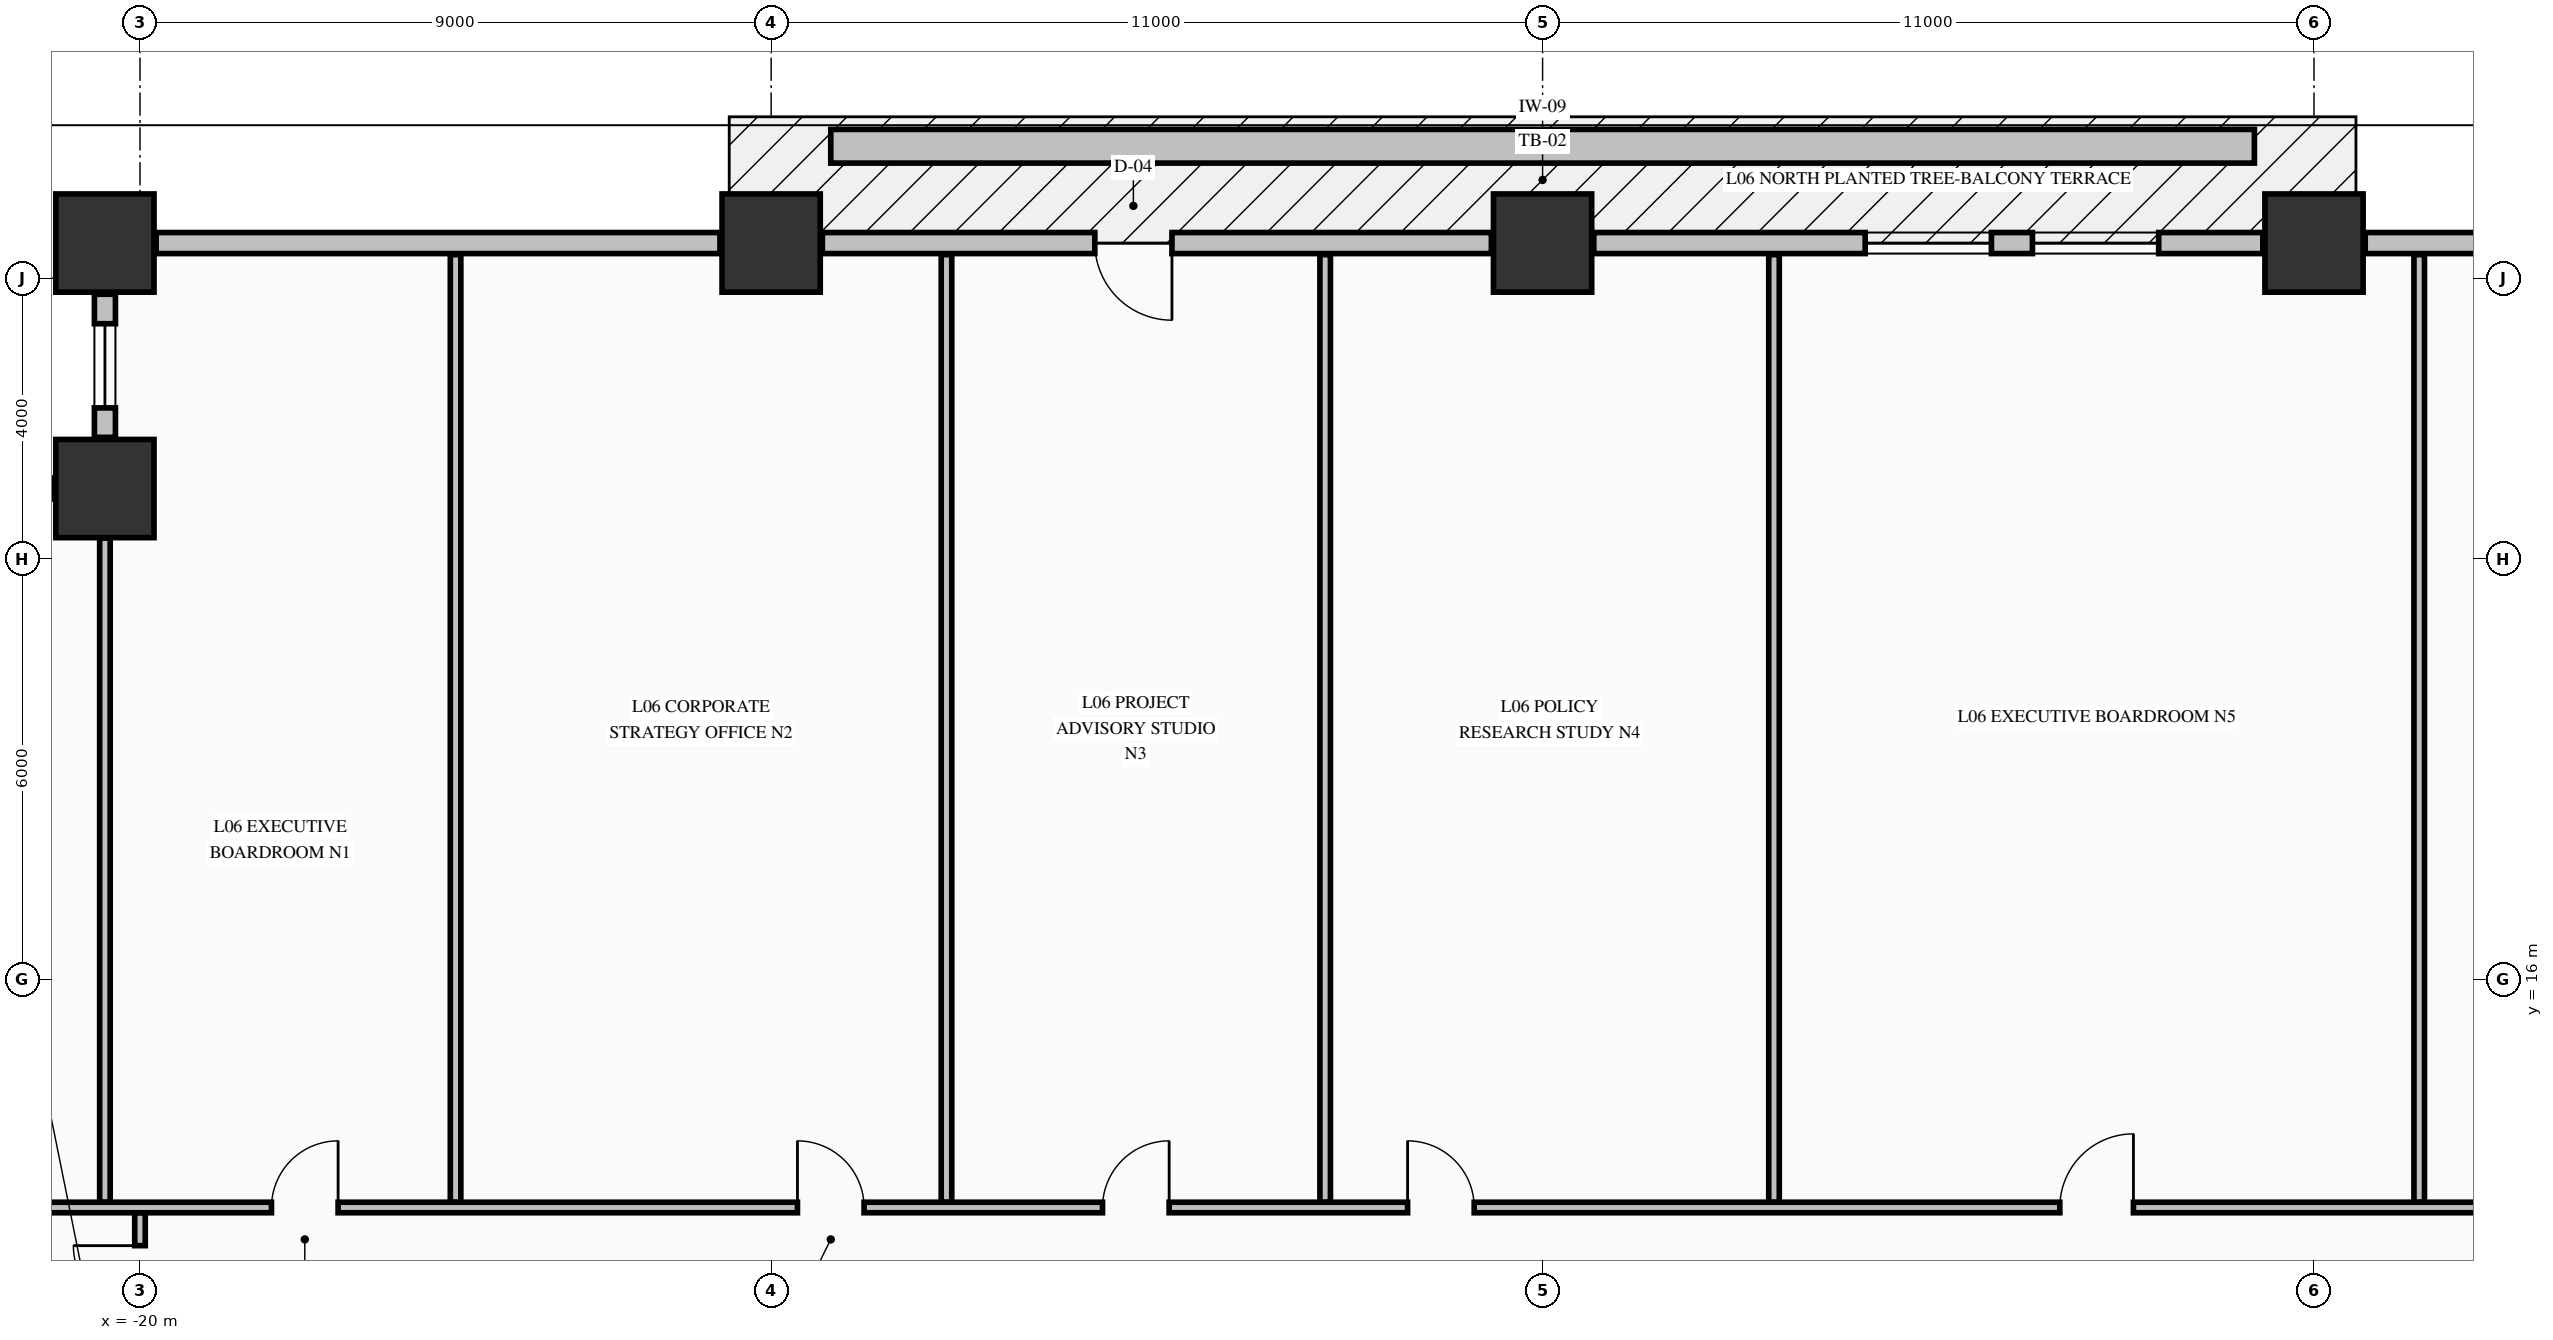
"""IFC4 building model, lengths in metres.
Left out: names, types, materials, properties, quantities, classifications, styles, units other than length and angle.
Written with IfcOpenShell. Run it as: python <this file> out.ifc"""

import sys

from ifc_helpers import new_model, si_unit, direction, frame, frame_2d, origin, origin_2d, place, context, subcontext, project, spatial, rectangle, extrude, element, fill, save


model = new_model("IFC4")
c1 = context("Model", 3, precision=1e-05, world=origin(), true_north=direction((0.0, 1.0)))
c2 = subcontext(c1, "Body", "Model", "MODEL_VIEW")
j1 = project(units=[si_unit("LENGTHUNIT", "METRE"), si_unit("PLANEANGLEUNIT", "RADIAN")], contexts=[c1])
p1 = place(None, origin())
s1 = spatial("IfcSite", under=j1, at=p1, CompositionType="ELEMENT")
p2 = place(p1, origin())
s2 = spatial("IfcBuilding", under=s1, at=p2, CompositionType="ELEMENT")
p3 = place(p2, frame((0.0, 0.0, 30.77)))
s3 = spatial("IfcBuildingStorey", under=s2, at=p3, CompositionType="ELEMENT", Elevation=30.77)
for number, where, z_axis, x_axis in (
    (1, (-20.5, 26.5, -0.25), (0.0, 0.0, 1.0), (1.0, 0.0, 0.0)),
    (2, (-11.0, 26.5, -0.25), (0.0, 0.0, 1.0), (1.0, 0.0, 0.0)),
    (3, (0.0, 26.5, -0.25), (0.0, 0.0, 1.0), (1.0, 0.0, 0.0)),
    (4, (11.0, 26.5, -0.25), (0.0, 0.0, 1.0), (1.0, 0.0, 0.0)),
    (5, (-20.5, 23.0, -0.25), (0.0, 0.0, 1.0), (1.0, 0.0, 0.0)),
):
    element("IfcColumn", number, at=place(p3, frame(where, z_axis=z_axis, x_axis=x_axis)), inside=s3, PredefinedType="COLUMN", context=c2, shape_type="SweptSolid", body=[
        extrude(rectangle(XDim=1.4, YDim=1.4, at=origin_2d()), origin(), (0.0, 0.0, 1.0), 3.52),
    ])
p4 = place(p3, frame((-20.5, 25.77, 0.0), z_axis=(0.0, 0.0, 1.0), x_axis=(0.0, -1.0, 0.0)))
e6 = element("IfcWall", 6, at=p4, inside=s3, PredefinedType="STANDARD", context=c2, shape_type="SweptSolid", body=[
    extrude(rectangle(XDim=2.04, YDim=0.3, at=frame_2d((1.02, 0.0))), origin(), (0.0, 0.0, 1.0), 2.662),
])
p5 = place(p4, frame((0.42, 0.0, 0.82)))
e7 = element("IfcOpeningElement", 7, at=p5, cuts=e6, PredefinedType="OPENING", context=c2, shape_type="SweptSolid", body=[
    extrude(rectangle(XDim=1.2, YDim=1.65, at=frame_2d((0.6, 0.825))), frame((0.0, 0.16, 0.0), z_axis=(0.0, -1.0, 0.0), x_axis=(1.0, 0.0, 0.0)), (0.0, 0.0, 1.0), 0.32),
])
p6 = place(p3, frame((-21.23, 23.0, 0.0), z_axis=(0.0, 0.0, 1.0), x_axis=(-1.0, 0.0, 0.0)))
e8 = element("IfcWall", 8, at=p6, inside=s3, PredefinedType="STANDARD", context=c2, shape_type="SweptSolid", body=[
    extrude(rectangle(XDim=2.04, YDim=0.3, at=frame_2d((1.02, 0.0))), origin(), (0.0, 0.0, 1.0), 2.662),
])
p7 = place(p6, frame((0.42, 0.0, 0.82)))
e9 = element("IfcOpeningElement", 9, at=p7, cuts=e8, PredefinedType="OPENING", context=c2, shape_type="SweptSolid", body=[
    extrude(rectangle(XDim=1.2, YDim=1.65, at=frame_2d((0.6, 0.825))), frame((0.0, 0.16, 0.0), z_axis=(0.0, -1.0, 0.0), x_axis=(1.0, 0.0, 0.0)), (0.0, 0.0, 1.0), 0.32),
])
p8 = place(p3, frame((-11.73, 26.5, 0.0), z_axis=(0.0, 0.0, 1.0), x_axis=(-1.0, 0.0, 0.0)))
e10 = element("IfcWall", 10, at=p8, inside=s3, PredefinedType="STANDARD", context=c2, shape_type="SweptSolid", body=[
    extrude(rectangle(XDim=8.04, YDim=0.3, at=frame_2d((4.02, 0.0))), origin(), (0.0, 0.0, 1.0), 2.662),
])
p9 = place(p3, frame((-0.73, 26.5, 0.0), z_axis=(0.0, 0.0, 1.0), x_axis=(-1.0, 0.0, 0.0)))
e11 = element("IfcWall", 11, at=p9, inside=s3, PredefinedType="STANDARD", context=c2, shape_type="SweptSolid", body=[
    extrude(rectangle(XDim=9.54, YDim=0.3, at=frame_2d((4.77, 0.0))), origin(), (0.0, 0.0, 1.0), 2.662),
])
p10 = place(p9, frame((4.555, 0.0, 0.0)))
e12 = element("IfcOpeningElement", 12, at=p10, cuts=e11, PredefinedType="OPENING", context=c2, shape_type="SweptSolid", body=[
    extrude(rectangle(XDim=1.1, YDim=2.15, at=frame_2d((0.55, 1.075))), frame((0.0, 0.16, 0.0), z_axis=(0.0, -1.0, 0.0), x_axis=(1.0, 0.0, 0.0)), (0.0, 0.0, 1.0), 0.32),
])
p11 = place(p3, frame((10.27, 26.5, 0.0), z_axis=(0.0, 0.0, 1.0), x_axis=(-1.0, 0.0, 0.0)))
e13 = element("IfcWall", 13, at=p11, inside=s3, PredefinedType="STANDARD", context=c2, shape_type="SweptSolid", body=[
    extrude(rectangle(XDim=9.54, YDim=0.3, at=frame_2d((4.77, 0.0))), origin(), (0.0, 0.0, 1.0), 2.662),
])
p12 = place(p11, frame((1.485, 0.0, 0.78)))
e14 = element("IfcOpeningElement", 14, at=p12, cuts=e13, PredefinedType="OPENING", context=c2, shape_type="SweptSolid", body=[
    extrude(rectangle(XDim=1.8, YDim=1.72, at=frame_2d((0.9, 0.86))), frame((0.0, 0.16, 0.0), z_axis=(0.0, -1.0, 0.0), x_axis=(1.0, 0.0, 0.0)), (0.0, 0.0, 1.0), 0.32),
])
p13 = place(p11, frame((3.87, 0.0, 0.78)))
e15 = element("IfcOpeningElement", 15, at=p13, cuts=e13, PredefinedType="OPENING", context=c2, shape_type="SweptSolid", body=[
    extrude(rectangle(XDim=1.8, YDim=1.72, at=frame_2d((0.9, 0.86))), frame((0.0, 0.16, 0.0), z_axis=(0.0, -1.0, 0.0), x_axis=(1.0, 0.0, 0.0)), (0.0, 0.0, 1.0), 0.32),
])
p14 = place(p3, frame((24.77, 26.5, 0.0), z_axis=(0.0, 0.0, 1.0), x_axis=(-1.0, 0.0, 0.0)))
e16 = element("IfcWall", 16, at=p14, inside=s3, PredefinedType="STANDARD", context=c2, shape_type="SweptSolid", body=[
    extrude(rectangle(XDim=13.04, YDim=0.3, at=frame_2d((6.52, 0.0))), origin(), (0.0, 0.0, 1.0), 2.662),
])
p15 = place(p3, frame((-23.835, 12.75, 0.0), z_axis=(0.0, 0.0, 1.0), x_axis=(1.0, 0.0, 0.0)))
e17 = element("IfcWall", 17, at=p15, inside=s3, PredefinedType="PARTITIONING", context=c2, shape_type="SweptSolid", body=[
    extrude(rectangle(XDim=52.67, YDim=0.15, at=frame_2d((26.335, 0.0))), origin(), (0.0, 0.0, 1.0), 3.27),
])
p16 = place(p15, frame((5.71, 0.0, 0.0)))
e18 = element("IfcOpeningElement", 18, at=p16, cuts=e17, PredefinedType="OPENING", context=c2, shape_type="SweptSolid", body=[
    extrude(rectangle(XDim=0.95, YDim=2.15, at=frame_2d((0.475, 1.075))), frame((0.0, 0.085, 0.0), z_axis=(0.0, -1.0, 0.0), x_axis=(1.0, 0.0, 0.0)), (0.0, 0.0, 1.0), 0.17),
])
p17 = place(p15, frame((13.21, 0.0, 0.0)))
e19 = element("IfcOpeningElement", 19, at=p17, cuts=e17, PredefinedType="OPENING", context=c2, shape_type="SweptSolid", body=[
    extrude(rectangle(XDim=0.95, YDim=2.15, at=frame_2d((0.475, 1.075))), frame((0.0, 0.085, 0.0), z_axis=(0.0, -1.0, 0.0), x_axis=(1.0, 0.0, 0.0)), (0.0, 0.0, 1.0), 0.17),
])
p18 = place(p15, frame((17.56, 0.0, 0.0)))
e20 = element("IfcOpeningElement", 20, at=p18, cuts=e17, PredefinedType="OPENING", context=c2, shape_type="SweptSolid", body=[
    extrude(rectangle(XDim=0.95, YDim=2.15, at=frame_2d((0.475, 1.075))), frame((0.0, 0.085, 0.0), z_axis=(0.0, -1.0, 0.0), x_axis=(1.0, 0.0, 0.0)), (0.0, 0.0, 1.0), 0.17),
])
p19 = place(p15, frame((21.91, 0.0, 0.0)))
e21 = element("IfcOpeningElement", 21, at=p19, cuts=e17, PredefinedType="OPENING", context=c2, shape_type="SweptSolid", body=[
    extrude(rectangle(XDim=0.95, YDim=2.15, at=frame_2d((0.475, 1.075))), frame((0.0, 0.085, 0.0), z_axis=(0.0, -1.0, 0.0), x_axis=(1.0, 0.0, 0.0)), (0.0, 0.0, 1.0), 0.17),
])
p20 = place(p15, frame((31.21, 0.0, 0.0)))
e22 = element("IfcOpeningElement", 22, at=p20, cuts=e17, PredefinedType="OPENING", context=c2, shape_type="SweptSolid", body=[
    extrude(rectangle(XDim=1.05, YDim=2.15, at=frame_2d((0.525, 1.075))), frame((0.0, 0.085, 0.0), z_axis=(0.0, -1.0, 0.0), x_axis=(1.0, 0.0, 0.0)), (0.0, 0.0, 1.0), 0.17),
])
p21 = place(p15, frame((39.46, 0.0, 0.0)))
e23 = element("IfcOpeningElement", 23, at=p21, cuts=e17, PredefinedType="OPENING", context=c2, shape_type="SweptSolid", body=[
    extrude(rectangle(XDim=1.05, YDim=2.15, at=frame_2d((0.525, 1.075))), frame((0.0, 0.085, 0.0), z_axis=(0.0, -1.0, 0.0), x_axis=(1.0, 0.0, 0.0)), (0.0, 0.0, 1.0), 0.17),
])
p22 = place(p3, frame((-20.5, 12.828, 0.0), z_axis=(0.0, 0.0, 1.0), x_axis=(0.0, 1.0, 0.0)))
e24 = element("IfcWall", 24, at=p22, inside=s3, PredefinedType="PARTITIONING", context=c2, shape_type="SweptSolid", body=[
    extrude(rectangle(XDim=9.466, YDim=0.15, at=frame_2d((4.733, 0.0))), origin(), (0.0, 0.0, 1.0), 3.27),
])
p23 = place(p3, frame((-20.0, 11.106, 0.0), z_axis=(0.0, 0.0, 1.0), x_axis=(0.0, 1.0, 0.0)))
e25 = element("IfcWall", 25, at=p23, inside=s3, PredefinedType="PARTITIONING", context=c2, shape_type="SweptSolid", body=[
    extrude(rectangle(XDim=1.566, YDim=0.15, at=frame_2d((0.783, 0.0))), origin(), (0.0, 0.0, 1.0), 3.27),
])
p24 = place(p23, frame((0.15, 0.0, 0.0)))
e26 = element("IfcOpeningElement", 26, at=p24, cuts=e25, PredefinedType="OPENING", context=c2, shape_type="SweptSolid", body=[
    extrude(rectangle(XDim=0.95, YDim=2.15, at=frame_2d((0.475, 1.075))), frame((0.0, 0.085, 0.0), z_axis=(0.0, -1.0, 0.0), x_axis=(1.0, 0.0, 0.0)), (0.0, 0.0, 1.0), 0.17),
])
for number, where, z_axis, x_axis in (
    (27, (-15.5, 12.828, 0.0), (0.0, 0.0, 1.0), (0.0, 1.0, 0.0)),
    (28, (-8.5, 12.828, 0.0), (0.0, 0.0, 1.0), (0.0, 1.0, 0.0)),
    (29, (-3.1, 12.828, 0.0), (0.0, 0.0, 1.0), (0.0, 1.0, 0.0)),
    (30, (3.3, 12.828, 0.0), (0.0, 0.0, 1.0), (0.0, 1.0, 0.0)),
    (31, (12.5, 12.828, 0.0), (0.0, 0.0, 1.0), (0.0, 1.0, 0.0)),
):
    element("IfcWall", number, at=place(p3, frame(where, z_axis=z_axis, x_axis=x_axis)), inside=s3, PredefinedType="PARTITIONING", context=c2, shape_type="SweptSolid", body=[
        extrude(rectangle(XDim=13.507, YDim=0.15, at=frame_2d((6.753, 0.0))), origin(), (0.0, 0.0, 1.0), 3.27),
    ])
p25 = place(p3, frame((-10.15, 27.88, -0.04), z_axis=(0.0, 0.0, 1.0), x_axis=(1.0, 0.0, 0.0)))
e32 = element("IfcWall", 32, at=p25, inside=s3, PredefinedType="PARAPET", context=c2, shape_type="SweptSolid", body=[
    extrude(rectangle(XDim=20.3, YDim=0.48, at=frame_2d((10.15, 0.0))), origin(), (0.0, 0.0, 1.0), 0.52),
])
p26 = place(p5, origin())
e33 = element("IfcWindow", 33, at=p26, inside=s3, PartitioningType="SINGLE_PANEL", PredefinedType="WINDOW", context=c2, shape_type="SweptSolid", body=[
    extrude(rectangle(XDim=1.2, YDim=1.65, at=frame_2d((0.6, 0.825))), frame((0.0, 0.03, 0.0), z_axis=(0.0, -1.0, 0.0), x_axis=(1.0, 0.0, 0.0)), (0.0, 0.0, 1.0), 0.06),
])
fill(e7, e33)
p27 = place(p10, origin())
e34 = element("IfcDoor", 34, at=p27, inside=s3, OperationType="SINGLE_SWING_LEFT", PredefinedType="DOOR", context=c2, shape_type="SweptSolid", body=[
    extrude(rectangle(XDim=1.1, YDim=2.15, at=frame_2d((0.55, 1.075))), frame((0.0, 0.025, 0.0), z_axis=(0.0, -1.0, 0.0), x_axis=(1.0, 0.0, 0.0)), (0.0, 0.0, 1.0), 0.05),
])
fill(e12, e34)
p28 = place(p12, origin())
e35 = element("IfcWindow", 35, at=p28, inside=s3, PartitioningType="SINGLE_PANEL", PredefinedType="WINDOW", context=c2, shape_type="SweptSolid", body=[
    extrude(rectangle(XDim=1.8, YDim=1.72, at=frame_2d((0.9, 0.86))), frame((0.0, 0.03, 0.0), z_axis=(0.0, -1.0, 0.0), x_axis=(1.0, 0.0, 0.0)), (0.0, 0.0, 1.0), 0.06),
])
fill(e14, e35)
p29 = place(p13, origin())
e36 = element("IfcWindow", 36, at=p29, inside=s3, PartitioningType="SINGLE_PANEL", PredefinedType="WINDOW", context=c2, shape_type="SweptSolid", body=[
    extrude(rectangle(XDim=1.8, YDim=1.72, at=frame_2d((0.9, 0.86))), frame((0.0, 0.03, 0.0), z_axis=(0.0, -1.0, 0.0), x_axis=(1.0, 0.0, 0.0)), (0.0, 0.0, 1.0), 0.06),
])
fill(e15, e36)
p30 = place(p16, origin())
e37 = element("IfcDoor", 37, at=p30, inside=s3, OperationType="SINGLE_SWING_RIGHT", PredefinedType="DOOR", context=c2, shape_type="SweptSolid", body=[
    extrude(rectangle(XDim=0.95, YDim=2.15, at=frame_2d((0.475, 1.075))), frame((0.0, 0.025, 0.0), z_axis=(0.0, -1.0, 0.0), x_axis=(1.0, 0.0, 0.0)), (0.0, 0.0, 1.0), 0.05),
])
fill(e18, e37)
p31 = place(p17, origin())
e38 = element("IfcDoor", 38, at=p31, inside=s3, OperationType="SINGLE_SWING_LEFT", PredefinedType="DOOR", context=c2, shape_type="SweptSolid", body=[
    extrude(rectangle(XDim=0.95, YDim=2.15, at=frame_2d((0.475, 1.075))), frame((0.0, 0.025, 0.0), z_axis=(0.0, -1.0, 0.0), x_axis=(1.0, 0.0, 0.0)), (0.0, 0.0, 1.0), 0.05),
])
fill(e19, e38)
p32 = place(p18, origin())
e39 = element("IfcDoor", 39, at=p32, inside=s3, OperationType="SINGLE_SWING_RIGHT", PredefinedType="DOOR", context=c2, shape_type="SweptSolid", body=[
    extrude(rectangle(XDim=0.95, YDim=2.15, at=frame_2d((0.475, 1.075))), frame((0.0, 0.025, 0.0), z_axis=(0.0, -1.0, 0.0), x_axis=(1.0, 0.0, 0.0)), (0.0, 0.0, 1.0), 0.05),
])
fill(e20, e39)
p33 = place(p19, origin())
e40 = element("IfcDoor", 40, at=p33, inside=s3, OperationType="SINGLE_SWING_LEFT", PredefinedType="DOOR", context=c2, shape_type="SweptSolid", body=[
    extrude(rectangle(XDim=0.95, YDim=2.15, at=frame_2d((0.475, 1.075))), frame((0.0, 0.025, 0.0), z_axis=(0.0, -1.0, 0.0), x_axis=(1.0, 0.0, 0.0)), (0.0, 0.0, 1.0), 0.05),
])
fill(e21, e40)
p34 = place(p20, origin())
e41 = element("IfcDoor", 41, at=p34, inside=s3, OperationType="SINGLE_SWING_RIGHT", PredefinedType="DOOR", context=c2, shape_type="SweptSolid", body=[
    extrude(rectangle(XDim=1.05, YDim=2.15, at=frame_2d((0.525, 1.075))), frame((0.0, 0.025, 0.0), z_axis=(0.0, -1.0, 0.0), x_axis=(1.0, 0.0, 0.0)), (0.0, 0.0, 1.0), 0.05),
])
fill(e22, e41)
p35 = place(p24, origin())
e42 = element("IfcDoor", 42, at=p35, inside=s3, OperationType="SINGLE_SWING_RIGHT", PredefinedType="DOOR", context=c2, shape_type="SweptSolid", body=[
    extrude(rectangle(XDim=0.95, YDim=2.15, at=frame_2d((0.475, 1.075))), frame((0.0, 0.025, 0.0), z_axis=(0.0, -1.0, 0.0), x_axis=(1.0, 0.0, 0.0)), (0.0, 0.0, 1.0), 0.05),
])
fill(e26, e42)
save(model, sys.argv[1])
